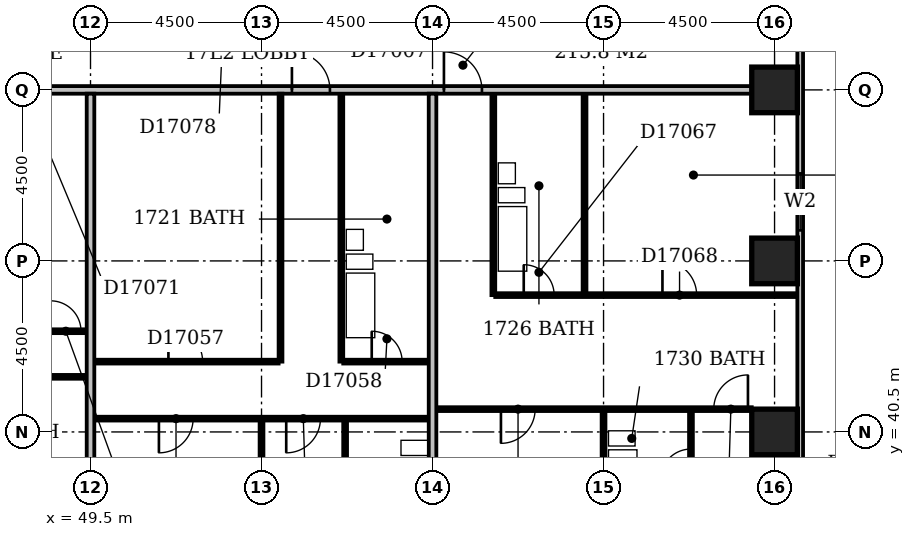
"""IFC4 building model, lengths in metres.
Left out: names, types, materials, properties, quantities, classifications, styles, units other than length and angle.
Written with IfcOpenShell. Run it as: python <this file> out.ifc"""

import sys

from ifc_helpers import new_model, si_unit, direction, frame, frame_2d, origin, origin_2d, place, context, subcontext, project, spatial, rectangle, extrude, element, fill, save


model = new_model("IFC4")
c1 = context("Model", 3, precision=1e-05, world=origin(), true_north=direction((0.0, 1.0)))
c2 = subcontext(c1, "Body", "Model", "MODEL_VIEW")
j1 = project(units=[si_unit("LENGTHUNIT", "METRE"), si_unit("PLANEANGLEUNIT", "RADIAN")], contexts=[c1])
p1 = place(None, origin())
s1 = spatial("IfcSite", under=j1, at=p1, CompositionType="ELEMENT")
p2 = place(p1, origin())
s2 = spatial("IfcBuilding", under=s1, at=p2, CompositionType="ELEMENT")
p3 = place(p2, frame((0.0, 0.0, 72.2)))
s3 = spatial("IfcBuildingStorey", under=s2, at=p3, CompositionType="ELEMENT", Elevation=72.2)
for number, where, z_axis, x_axis in (
    (1, (67.5, 40.5, -0.3), (0.0, 0.0, 1.0), (1.0, 0.0, 0.0)),
    (2, (67.5, 45.0, -0.3), (0.0, 0.0, 1.0), (1.0, 0.0, 0.0)),
    (3, (67.5, 49.5, -0.3), (0.0, 0.0, 1.0), (1.0, 0.0, 0.0)),
):
    element("IfcColumn", number, at=place(p3, frame(where, z_axis=z_axis, x_axis=x_axis)), inside=s3, PredefinedType="COLUMN", context=c2, shape_type="SweptSolid", body=[
        extrude(rectangle(XDim=1.2, YDim=1.2, at=origin_2d()), origin(), (0.0, 0.0, 1.0), 3.6),
    ])
p4 = place(p3, frame((68.175, 35.4, 0.0), z_axis=(0.0, 0.0, 1.0), x_axis=(0.0, 1.0, 0.0)))
e4 = element("IfcWall", 4, at=p4, inside=s3, PredefinedType="STANDARD", context=c2, shape_type="SweptSolid", body=[
    extrude(rectangle(XDim=23.85, YDim=0.15, at=frame_2d((11.925, 0.0))), origin(), (0.0, 0.0, 1.0), 2.7),
])
p5 = place(p4, frame((1.65, 0.0, 0.6)))
e5 = element("IfcOpeningElement", 5, at=p5, cuts=e4, PredefinedType="OPENING", context=c2, shape_type="SweptSolid", body=[
    extrude(rectangle(XDim=2.4, YDim=1.8, at=frame_2d((1.2, 0.9))), frame((0.0, 0.087, 0.0), z_axis=(0.0, -1.0, 0.0), x_axis=(1.0, 0.0, 0.0)), (0.0, 0.0, 1.0), 0.174),
])
p6 = place(p4, frame((10.403, 0.0, 0.6)))
e6 = element("IfcOpeningElement", 6, at=p6, cuts=e4, PredefinedType="OPENING", context=c2, shape_type="SweptSolid", body=[
    extrude(rectangle(XDim=1.5, YDim=1.8, at=frame_2d((0.75, 0.9))), frame((0.0, 0.087, 0.0), z_axis=(0.0, -1.0, 0.0), x_axis=(1.0, 0.0, 0.0)), (0.0, 0.0, 1.0), 0.174),
])
p7 = place(p4, frame((19.65, 0.0, 0.6)))
e7 = element("IfcOpeningElement", 7, at=p7, cuts=e4, PredefinedType="OPENING", context=c2, shape_type="SweptSolid", body=[
    extrude(rectangle(XDim=2.4, YDim=1.8, at=frame_2d((1.2, 0.9))), frame((0.0, 0.087, 0.0), z_axis=(0.0, -1.0, 0.0), x_axis=(1.0, 0.0, 0.0)), (0.0, 0.0, 1.0), 0.174),
])
p8 = place(p3, frame((49.5, 36.6, 0.0), z_axis=(0.0, 0.0, 1.0), x_axis=(0.0, 1.0, 0.0)))
e8 = element("IfcWall", 8, at=p8, inside=s3, PredefinedType="PARTITIONING", context=c2, shape_type="SweptSolid", body=[
    extrude(rectangle(XDim=12.8, YDim=0.2, at=frame_2d((6.4, 0.0))), origin(), (0.0, 0.0, 1.0), 3.3),
])
p9 = place(p3, frame((54.0, 36.6, 0.0), z_axis=(0.0, 0.0, 1.0), x_axis=(0.0, 1.0, 0.0)))
e9 = element("IfcWall", 9, at=p9, inside=s3, PredefinedType="PARTITIONING", context=c2, shape_type="SweptSolid", body=[
    extrude(rectangle(XDim=4.2, YDim=0.1, at=frame_2d((2.1, 0.0))), origin(), (0.0, 0.0, 1.0), 2.6),
])
p10 = place(p3, frame((58.5, 36.6, 0.0), z_axis=(0.0, 0.0, 1.0), x_axis=(0.0, 1.0, 0.0)))
e10 = element("IfcWall", 10, at=p10, inside=s3, PredefinedType="PARTITIONING", context=c2, shape_type="SweptSolid", body=[
    extrude(rectangle(XDim=12.8, YDim=0.2, at=frame_2d((6.4, 0.0))), origin(), (0.0, 0.0, 1.0), 3.3),
])
p11 = place(p3, frame((63.0, 36.6, 0.0), z_axis=(0.0, 0.0, 1.0), x_axis=(0.0, 1.0, 0.0)))
e11 = element("IfcWall", 11, at=p11, inside=s3, PredefinedType="PARTITIONING", context=c2, shape_type="SweptSolid", body=[
    extrude(rectangle(XDim=4.45, YDim=0.1, at=frame_2d((2.225, 0.0))), origin(), (0.0, 0.0, 1.0), 2.4),
])
p12 = place(p3, frame((56.2, 37.95, 0.0), z_axis=(0.0, 0.0, 1.0), x_axis=(0.0, 1.0, 0.0)))
e12 = element("IfcWall", 12, at=p12, inside=s3, PredefinedType="PLUMBINGWALL", context=c2, shape_type="SweptSolid", body=[
    extrude(rectangle(XDim=2.85, YDim=0.1, at=frame_2d((1.425, 0.0))), origin(), (0.0, 0.0, 1.0), 3.3),
])
p13 = place(p12, frame((1.05, 0.0, 0.0)))
e13 = element("IfcOpeningElement", 13, at=p13, cuts=e12, PredefinedType="OPENING", context=c2, shape_type="SweptSolid", body=[
    extrude(rectangle(XDim=0.8, YDim=2.1, at=frame_2d((0.4, 1.05))), frame((0.0, 0.062, 0.0), z_axis=(0.0, -1.0, 0.0), x_axis=(1.0, 0.0, 0.0)), (0.0, 0.0, 1.0), 0.124),
])
p14 = place(p3, frame((65.3, 38.2, 0.0), z_axis=(0.0, 0.0, 1.0), x_axis=(0.0, 1.0, 0.0)))
e14 = element("IfcWall", 14, at=p14, inside=s3, PredefinedType="PLUMBINGWALL", context=c2, shape_type="SweptSolid", body=[
    extrude(rectangle(XDim=2.85, YDim=0.1, at=frame_2d((1.425, 0.0))), origin(), (0.0, 0.0, 1.0), 3.3),
])
p15 = place(p14, frame((1.05, 0.0, 0.0)))
e15 = element("IfcOpeningElement", 15, at=p15, cuts=e14, PredefinedType="OPENING", context=c2, shape_type="SweptSolid", body=[
    extrude(rectangle(XDim=0.8, YDim=2.1, at=frame_2d((0.4, 1.05))), frame((0.0, 0.062, 0.0), z_axis=(0.0, -1.0, 0.0), x_axis=(1.0, 0.0, 0.0)), (0.0, 0.0, 1.0), 0.124),
])
p16 = place(p3, frame((49.6, 40.85, 0.0), z_axis=(0.0, 0.0, 1.0), x_axis=(1.0, 0.0, 0.0)))
e16 = element("IfcWall", 16, at=p16, inside=s3, PredefinedType="PARTITIONING", context=c2, shape_type="SweptSolid", body=[
    extrude(rectangle(XDim=8.8, YDim=0.1, at=frame_2d((4.4, 0.0))), origin(), (0.0, 0.0, 1.0), 3.3),
])
p17 = place(p16, frame((1.7, 0.0, 0.0)))
e17 = element("IfcOpeningElement", 17, at=p17, cuts=e16, PredefinedType="OPENING", context=c2, shape_type="SweptSolid", body=[
    extrude(rectangle(XDim=0.9, YDim=2.1, at=frame_2d((0.45, 1.05))), frame((0.0, 0.062, 0.0), z_axis=(0.0, -1.0, 0.0), x_axis=(1.0, 0.0, 0.0)), (0.0, 0.0, 1.0), 0.124),
])
p18 = place(p16, frame((5.05, 0.0, 0.0)))
e18 = element("IfcOpeningElement", 18, at=p18, cuts=e16, PredefinedType="OPENING", context=c2, shape_type="SweptSolid", body=[
    extrude(rectangle(XDim=0.9, YDim=2.1, at=frame_2d((0.45, 1.05))), frame((0.0, 0.062, 0.0), z_axis=(0.0, -1.0, 0.0), x_axis=(1.0, 0.0, 0.0)), (0.0, 0.0, 1.0), 0.124),
])
p19 = place(p3, frame((58.6, 41.1, 0.0), z_axis=(0.0, 0.0, 1.0), x_axis=(1.0, 0.0, 0.0)))
e19 = element("IfcWall", 19, at=p19, inside=s3, PredefinedType="PARTITIONING", context=c2, shape_type="SweptSolid", body=[
    extrude(rectangle(XDim=8.3, YDim=0.1, at=frame_2d((4.15, 0.0))), origin(), (0.0, 0.0, 1.0), 3.3),
])
p20 = place(p19, frame((1.7, 0.0, 0.0)))
e20 = element("IfcOpeningElement", 20, at=p20, cuts=e19, PredefinedType="OPENING", context=c2, shape_type="SweptSolid", body=[
    extrude(rectangle(XDim=0.9, YDim=2.1, at=frame_2d((0.45, 1.05))), frame((0.0, 0.062, 0.0), z_axis=(0.0, -1.0, 0.0), x_axis=(1.0, 0.0, 0.0)), (0.0, 0.0, 1.0), 0.124),
])
p21 = place(p19, frame((7.3, 0.0, 0.0)))
e21 = element("IfcOpeningElement", 21, at=p21, cuts=e19, PredefinedType="OPENING", context=c2, shape_type="SweptSolid", body=[
    extrude(rectangle(XDim=0.9, YDim=2.1, at=frame_2d((0.45, 1.05))), frame((0.0, 0.062, 0.0), z_axis=(0.0, -1.0, 0.0), x_axis=(1.0, 0.0, 0.0)), (0.0, 0.0, 1.0), 0.124),
])
p22 = place(p3, frame((45.1, 41.95, 0.0), z_axis=(0.0, 0.0, 1.0), x_axis=(1.0, 0.0, 0.0)))
e22 = element("IfcWall", 22, at=p22, inside=s3, PredefinedType="PARTITIONING", context=c2, shape_type="SweptSolid", body=[
    extrude(rectangle(XDim=4.3, YDim=0.1, at=frame_2d((2.15, 0.0))), origin(), (0.0, 0.0, 1.0), 3.3),
])
p23 = place(p22, frame((1.7, 0.0, 0.0)))
e23 = element("IfcOpeningElement", 23, at=p23, cuts=e22, PredefinedType="OPENING", context=c2, shape_type="SweptSolid", body=[
    extrude(rectangle(XDim=0.9, YDim=2.1, at=frame_2d((0.45, 1.05))), frame((0.0, 0.062, 0.0), z_axis=(0.0, -1.0, 0.0), x_axis=(1.0, 0.0, 0.0)), (0.0, 0.0, 1.0), 0.124),
])
p24 = place(p3, frame((49.6, 42.35, 0.0), z_axis=(0.0, 0.0, 1.0), x_axis=(1.0, 0.0, 0.0)))
e24 = element("IfcWall", 24, at=p24, inside=s3, PredefinedType="PARTITIONING", context=c2, shape_type="SweptSolid", body=[
    extrude(rectangle(XDim=4.85, YDim=0.1, at=frame_2d((2.425, 0.0))), origin(), (0.0, 0.0, 1.0), 3.3),
])
p25 = place(p24, frame((1.95, 0.0, 0.0)))
e25 = element("IfcOpeningElement", 25, at=p25, cuts=e24, PredefinedType="OPENING", context=c2, shape_type="SweptSolid", body=[
    extrude(rectangle(XDim=0.9, YDim=2.1, at=frame_2d((0.45, 1.05))), frame((0.0, 0.062, 0.0), z_axis=(0.0, -1.0, 0.0), x_axis=(1.0, 0.0, 0.0)), (0.0, 0.0, 1.0), 0.124),
])
p26 = place(p3, frame((54.5, 42.35, 0.0), z_axis=(0.0, 0.0, 1.0), x_axis=(0.0, 1.0, 0.0)))
e26 = element("IfcWall", 26, at=p26, inside=s3, PredefinedType="PARTITIONING", context=c2, shape_type="SweptSolid", body=[
    extrude(rectangle(XDim=7.05, YDim=0.1, at=frame_2d((3.525, 0.0))), origin(), (0.0, 0.0, 1.0), 2.6),
])
p27 = place(p3, frame((56.1, 42.35, 0.0), z_axis=(0.0, 0.0, 1.0), x_axis=(0.0, 1.0, 0.0)))
e27 = element("IfcWall", 27, at=p27, inside=s3, PredefinedType="PLUMBINGWALL", context=c2, shape_type="SweptSolid", body=[
    extrude(rectangle(XDim=7.05, YDim=0.1, at=frame_2d((3.525, 0.0))), origin(), (0.0, 0.0, 1.0), 3.3),
])
p28 = place(p3, frame((56.15, 42.35, 0.0), z_axis=(0.0, 0.0, 1.0), x_axis=(1.0, 0.0, 0.0)))
e28 = element("IfcWall", 28, at=p28, inside=s3, PredefinedType="PARTITIONING", context=c2, shape_type="SweptSolid", body=[
    extrude(rectangle(XDim=2.25, YDim=0.1, at=frame_2d((1.125, 0.0))), origin(), (0.0, 0.0, 1.0), 3.3),
])
p29 = place(p28, frame((0.75, 0.0, 0.0)))
e29 = element("IfcOpeningElement", 29, at=p29, cuts=e28, PredefinedType="OPENING", context=c2, shape_type="SweptSolid", body=[
    extrude(rectangle(XDim=0.8, YDim=2.1, at=frame_2d((0.4, 1.05))), frame((0.0, 0.062, 0.0), z_axis=(0.0, -1.0, 0.0), x_axis=(1.0, 0.0, 0.0)), (0.0, 0.0, 1.0), 0.124),
])
p30 = place(p3, frame((48.25, 43.15, 0.0), z_axis=(0.0, 0.0, 1.0), x_axis=(1.0, 0.0, 0.0)))
e30 = element("IfcWall", 30, at=p30, inside=s3, PredefinedType="PARTITIONING", context=c2, shape_type="SweptSolid", body=[
    extrude(rectangle(XDim=1.15, YDim=0.1, at=frame_2d((0.575, 0.0))), origin(), (0.0, 0.0, 1.0), 3.3),
])
p31 = place(p30, frame((0.2, 0.0, 0.0)))
e31 = element("IfcOpeningElement", 31, at=p31, cuts=e30, PredefinedType="OPENING", context=c2, shape_type="SweptSolid", body=[
    extrude(rectangle(XDim=0.8, YDim=2.1, at=frame_2d((0.4, 1.05))), frame((0.0, 0.062, 0.0), z_axis=(0.0, -1.0, 0.0), x_axis=(1.0, 0.0, 0.0)), (0.0, 0.0, 1.0), 0.124),
])
p32 = place(p3, frame((60.1, 44.1, 0.0), z_axis=(0.0, 0.0, 1.0), x_axis=(0.0, 1.0, 0.0)))
e32 = element("IfcWall", 32, at=p32, inside=s3, PredefinedType="PLUMBINGWALL", context=c2, shape_type="SweptSolid", body=[
    extrude(rectangle(XDim=5.3, YDim=0.1, at=frame_2d((2.65, 0.0))), origin(), (0.0, 0.0, 1.0), 3.3),
])
p33 = place(p3, frame((60.15, 44.1, 0.0), z_axis=(0.0, 0.0, 1.0), x_axis=(1.0, 0.0, 0.0)))
e33 = element("IfcWall", 33, at=p33, inside=s3, PredefinedType="PARTITIONING", context=c2, shape_type="SweptSolid", body=[
    extrude(rectangle(XDim=7.95, YDim=0.1, at=frame_2d((3.975, 0.0))), origin(), (0.0, 0.0, 1.0), 3.3),
])
p34 = place(p33, frame((0.75, 0.0, 0.0)))
e34 = element("IfcOpeningElement", 34, at=p34, cuts=e33, PredefinedType="OPENING", context=c2, shape_type="SweptSolid", body=[
    extrude(rectangle(XDim=0.8, YDim=2.1, at=frame_2d((0.4, 1.05))), frame((0.0, 0.062, 0.0), z_axis=(0.0, -1.0, 0.0), x_axis=(1.0, 0.0, 0.0)), (0.0, 0.0, 1.0), 0.124),
])
p35 = place(p33, frame((4.4, 0.0, 0.0)))
e35 = element("IfcOpeningElement", 35, at=p35, cuts=e33, PredefinedType="OPENING", context=c2, shape_type="SweptSolid", body=[
    extrude(rectangle(XDim=0.9, YDim=2.1, at=frame_2d((0.45, 1.05))), frame((0.0, 0.062, 0.0), z_axis=(0.0, -1.0, 0.0), x_axis=(1.0, 0.0, 0.0)), (0.0, 0.0, 1.0), 0.124),
])
p36 = place(p3, frame((62.5, 44.15, 0.0), z_axis=(0.0, 0.0, 1.0), x_axis=(0.0, 1.0, 0.0)))
e36 = element("IfcWall", 36, at=p36, inside=s3, PredefinedType="PLUMBINGWALL", context=c2, shape_type="SweptSolid", body=[
    extrude(rectangle(XDim=5.25, YDim=0.1, at=frame_2d((2.625, 0.0))), origin(), (0.0, 0.0, 1.0), 2.4),
])
p37 = place(p3, frame((9.1, 49.5, 0.0), z_axis=(0.0, 0.0, 1.0), x_axis=(1.0, 0.0, 0.0)))
e37 = element("IfcWall", 37, at=p37, inside=s3, PredefinedType="PARTITIONING", context=c2, shape_type="SweptSolid", body=[
    extrude(rectangle(XDim=57.8, YDim=0.2, at=frame_2d((28.9, 0.0))), origin(), (0.0, 0.0, 1.0), 3.3),
])
p38 = place(p37, frame((13.7, 0.0, 0.0)))
e38 = element("IfcOpeningElement", 38, at=p38, cuts=e37, PredefinedType="OPENING", context=c2, shape_type="SweptSolid", body=[
    extrude(rectangle(XDim=1.0, YDim=2.1, at=frame_2d((0.5, 1.05))), frame((0.0, 0.112, 0.0), z_axis=(0.0, -1.0, 0.0), x_axis=(1.0, 0.0, 0.0)), (0.0, 0.0, 1.0), 0.224),
])
p39 = place(p37, frame((32.2, 0.0, 0.0)))
e39 = element("IfcOpeningElement", 39, at=p39, cuts=e37, PredefinedType="OPENING", context=c2, shape_type="SweptSolid", body=[
    extrude(rectangle(XDim=1.0, YDim=2.1, at=frame_2d((0.5, 1.05))), frame((0.0, 0.112, 0.0), z_axis=(0.0, -1.0, 0.0), x_axis=(1.0, 0.0, 0.0)), (0.0, 0.0, 1.0), 0.224),
])
p40 = place(p37, frame((37.85, 0.0, 0.0)))
e40 = element("IfcOpeningElement", 40, at=p40, cuts=e37, PredefinedType="OPENING", context=c2, shape_type="SweptSolid", body=[
    extrude(rectangle(XDim=1.0, YDim=2.1, at=frame_2d((0.5, 1.05))), frame((0.0, 0.112, 0.0), z_axis=(0.0, -1.0, 0.0), x_axis=(1.0, 0.0, 0.0)), (0.0, 0.0, 1.0), 0.224),
])
p41 = place(p37, frame((45.7, 0.0, 0.0)))
e41 = element("IfcOpeningElement", 41, at=p41, cuts=e37, PredefinedType="OPENING", context=c2, shape_type="SweptSolid", body=[
    extrude(rectangle(XDim=1.0, YDim=2.1, at=frame_2d((0.5, 1.05))), frame((0.0, 0.112, 0.0), z_axis=(0.0, -1.0, 0.0), x_axis=(1.0, 0.0, 0.0)), (0.0, 0.0, 1.0), 0.224),
])
p42 = place(p37, frame((49.7, 0.0, 0.0)))
e42 = element("IfcOpeningElement", 42, at=p42, cuts=e37, PredefinedType="OPENING", context=c2, shape_type="SweptSolid", body=[
    extrude(rectangle(XDim=1.0, YDim=2.1, at=frame_2d((0.5, 1.05))), frame((0.0, 0.112, 0.0), z_axis=(0.0, -1.0, 0.0), x_axis=(1.0, 0.0, 0.0)), (0.0, 0.0, 1.0), 0.224),
])
p43 = place(p37, frame((8.4, 0.0, 0.0)))
e43 = element("IfcOpeningElement", 43, at=p43, cuts=e37, PredefinedType="OPENING", context=c2, shape_type="SweptSolid", body=[
    extrude(rectangle(XDim=0.9, YDim=2.1, at=frame_2d((0.45, 1.05))), frame((0.0, 0.112, 0.0), z_axis=(0.0, -1.0, 0.0), x_axis=(1.0, 0.0, 0.0)), (0.0, 0.0, 1.0), 0.224),
])
p44 = place(p6, origin())
e44 = element("IfcWindow", 44, at=p44, inside=s3, PartitioningType="SINGLE_PANEL", PredefinedType="WINDOW", context=c2, shape_type="SweptSolid", body=[
    extrude(rectangle(XDim=1.5, YDim=1.8, at=frame_2d((0.75, 0.9))), frame((0.0, 0.03, 0.0), z_axis=(0.0, -1.0, 0.0), x_axis=(1.0, 0.0, 0.0)), (0.0, 0.0, 1.0), 0.06),
])
fill(e6, e44)
p45 = place(p15, origin())
e45 = element("IfcDoor", 45, at=p45, inside=s3, OperationType="SINGLE_SWING_LEFT", PredefinedType="DOOR", context=c2, shape_type="SweptSolid", body=[
    extrude(rectangle(XDim=0.8, YDim=2.1, at=frame_2d((0.4, 1.05))), frame((0.0, 0.025, 0.0), z_axis=(0.0, -1.0, 0.0), x_axis=(1.0, 0.0, 0.0)), (0.0, 0.0, 1.0), 0.05),
])
fill(e15, e45)
p46 = place(p17, frame((0.9, 0.0, 0.0), z_axis=(0.0, 0.0, 1.0), x_axis=(-1.0, 0.0, 0.0)))
e46 = element("IfcDoor", 46, at=p46, inside=s3, OperationType="SINGLE_SWING_RIGHT", PredefinedType="DOOR", context=c2, shape_type="SweptSolid", body=[
    extrude(rectangle(XDim=0.9, YDim=2.1, at=frame_2d((0.45, 1.05))), frame((0.0, 0.025, 0.0), z_axis=(0.0, -1.0, 0.0), x_axis=(1.0, 0.0, 0.0)), (0.0, 0.0, 1.0), 0.05),
])
fill(e17, e46)
p47 = place(p18, frame((0.9, 0.0, 0.0), z_axis=(0.0, 0.0, 1.0), x_axis=(-1.0, 0.0, 0.0)))
e47 = element("IfcDoor", 47, at=p47, inside=s3, OperationType="SINGLE_SWING_RIGHT", PredefinedType="DOOR", context=c2, shape_type="SweptSolid", body=[
    extrude(rectangle(XDim=0.9, YDim=2.1, at=frame_2d((0.45, 1.05))), frame((0.0, 0.025, 0.0), z_axis=(0.0, -1.0, 0.0), x_axis=(1.0, 0.0, 0.0)), (0.0, 0.0, 1.0), 0.05),
])
fill(e18, e47)
p48 = place(p20, frame((0.9, 0.0, 0.0), z_axis=(0.0, 0.0, 1.0), x_axis=(-1.0, 0.0, 0.0)))
e48 = element("IfcDoor", 48, at=p48, inside=s3, OperationType="SINGLE_SWING_RIGHT", PredefinedType="DOOR", context=c2, shape_type="SweptSolid", body=[
    extrude(rectangle(XDim=0.9, YDim=2.1, at=frame_2d((0.45, 1.05))), frame((0.0, 0.025, 0.0), z_axis=(0.0, -1.0, 0.0), x_axis=(1.0, 0.0, 0.0)), (0.0, 0.0, 1.0), 0.05),
])
fill(e20, e48)
p49 = place(p21, frame((0.9, 0.0, 0.0), z_axis=(0.0, 0.0, 1.0), x_axis=(-1.0, 0.0, 0.0)))
e49 = element("IfcDoor", 49, at=p49, inside=s3, OperationType="SINGLE_SWING_LEFT", PredefinedType="DOOR", context=c2, shape_type="SweptSolid", body=[
    extrude(rectangle(XDim=0.9, YDim=2.1, at=frame_2d((0.45, 1.05))), frame((0.0, 0.025, 0.0), z_axis=(0.0, -1.0, 0.0), x_axis=(1.0, 0.0, 0.0)), (0.0, 0.0, 1.0), 0.05),
])
fill(e21, e49)
p50 = place(p25, origin())
e50 = element("IfcDoor", 50, at=p50, inside=s3, OperationType="SINGLE_SWING_LEFT", PredefinedType="DOOR", context=c2, shape_type="SweptSolid", body=[
    extrude(rectangle(XDim=0.9, YDim=2.1, at=frame_2d((0.45, 1.05))), frame((0.0, 0.025, 0.0), z_axis=(0.0, -1.0, 0.0), x_axis=(1.0, 0.0, 0.0)), (0.0, 0.0, 1.0), 0.05),
])
fill(e25, e50)
p51 = place(p29, origin())
e51 = element("IfcDoor", 51, at=p51, inside=s3, OperationType="SINGLE_SWING_LEFT", PredefinedType="DOOR", context=c2, shape_type="SweptSolid", body=[
    extrude(rectangle(XDim=0.8, YDim=2.1, at=frame_2d((0.4, 1.05))), frame((0.0, 0.025, 0.0), z_axis=(0.0, -1.0, 0.0), x_axis=(1.0, 0.0, 0.0)), (0.0, 0.0, 1.0), 0.05),
])
fill(e29, e51)
p52 = place(p31, origin())
e52 = element("IfcDoor", 52, at=p52, inside=s3, OperationType="SINGLE_SWING_LEFT", PredefinedType="DOOR", context=c2, shape_type="SweptSolid", body=[
    extrude(rectangle(XDim=0.8, YDim=2.1, at=frame_2d((0.4, 1.05))), frame((0.0, 0.025, 0.0), z_axis=(0.0, -1.0, 0.0), x_axis=(1.0, 0.0, 0.0)), (0.0, 0.0, 1.0), 0.05),
])
fill(e31, e52)
p53 = place(p34, origin())
e53 = element("IfcDoor", 53, at=p53, inside=s3, OperationType="SINGLE_SWING_LEFT", PredefinedType="DOOR", context=c2, shape_type="SweptSolid", body=[
    extrude(rectangle(XDim=0.8, YDim=2.1, at=frame_2d((0.4, 1.05))), frame((0.0, 0.025, 0.0), z_axis=(0.0, -1.0, 0.0), x_axis=(1.0, 0.0, 0.0)), (0.0, 0.0, 1.0), 0.05),
])
fill(e34, e53)
p54 = place(p35, origin())
e54 = element("IfcDoor", 54, at=p54, inside=s3, OperationType="SINGLE_SWING_LEFT", PredefinedType="DOOR", context=c2, shape_type="SweptSolid", body=[
    extrude(rectangle(XDim=0.9, YDim=2.1, at=frame_2d((0.45, 1.05))), frame((0.0, 0.025, 0.0), z_axis=(0.0, -1.0, 0.0), x_axis=(1.0, 0.0, 0.0)), (0.0, 0.0, 1.0), 0.05),
])
fill(e35, e54)
p55 = place(p41, origin())
e55 = element("IfcDoor", 55, at=p55, inside=s3, OperationType="SINGLE_SWING_LEFT", PredefinedType="DOOR", context=c2, shape_type="SweptSolid", body=[
    extrude(rectangle(XDim=1.0, YDim=2.1, at=frame_2d((0.5, 1.05))), frame((0.0, 0.025, 0.0), z_axis=(0.0, -1.0, 0.0), x_axis=(1.0, 0.0, 0.0)), (0.0, 0.0, 1.0), 0.05),
])
fill(e41, e55)
p56 = place(p42, origin())
e56 = element("IfcDoor", 56, at=p56, inside=s3, OperationType="SINGLE_SWING_LEFT", PredefinedType="DOOR", context=c2, shape_type="SweptSolid", body=[
    extrude(rectangle(XDim=1.0, YDim=2.1, at=frame_2d((0.5, 1.05))), frame((0.0, 0.025, 0.0), z_axis=(0.0, -1.0, 0.0), x_axis=(1.0, 0.0, 0.0)), (0.0, 0.0, 1.0), 0.05),
])
fill(e42, e56)
save(model, sys.argv[1])
